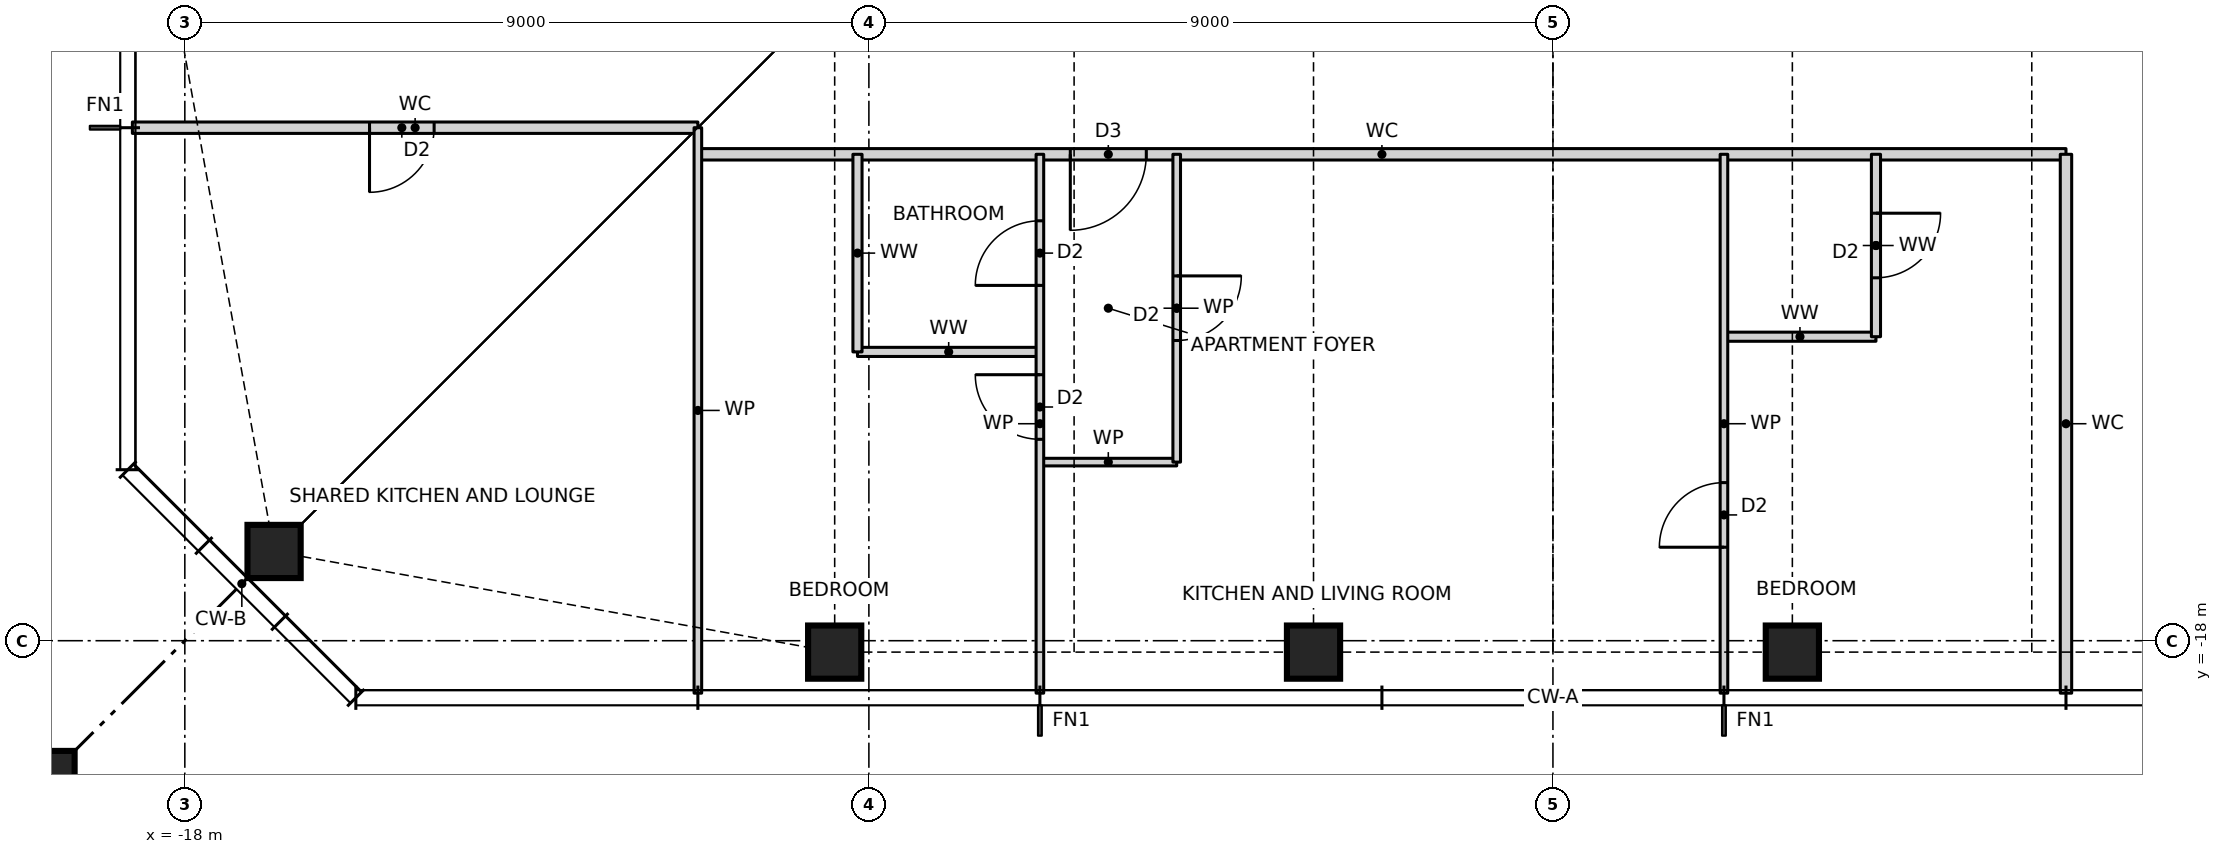
"""IFC4 building model, lengths in metres.
Left out: names, types, materials, properties, quantities, classifications, styles, units other than length and angle.
Written with IfcOpenShell. Run it as: python <this file> out.ifc"""

import sys

from ifc_helpers import new_model, si_unit, direction, frame, frame_2d, origin, origin_2d, place, context, subcontext, project, spatial, rectangle, hollow_rectangle, i_section, extrude, element, fill, save


model = new_model("IFC4")
c1 = context("Model", 3, precision=1e-05, world=origin(), true_north=direction((0.0, 1.0)))
c2 = subcontext(c1, "Body", "Model", "MODEL_VIEW")
j1 = project(units=[si_unit("LENGTHUNIT", "METRE"), si_unit("PLANEANGLEUNIT", "RADIAN")], contexts=[c1])
p1 = place(None, origin())
s1 = spatial("IfcSite", under=j1, at=p1, CompositionType="ELEMENT")
p2 = place(p1, origin())
s2 = spatial("IfcBuilding", under=s1, at=p2, CompositionType="ELEMENT")
p3 = place(p2, frame((0.0, 0.0, 177.5)))
s3 = spatial("IfcBuildingStorey", under=s2, at=p3, CompositionType="ELEMENT", Elevation=177.5)
for number, where, z_axis, x_axis in (
    (1, (-16.826, -16.826, 0.0), (0.0, 0.0, 1.0), (1.0, 0.0, 0.0)),
    (2, (-9.45, -18.15, 0.0), (0.0, 0.0, 1.0), (1.0, 0.0, 0.0)),
    (3, (-3.15, -18.15, 0.0), (0.0, 0.0, 1.0), (1.0, 0.0, 0.0)),
    (4, (3.15, -18.15, 0.0), (0.0, 0.0, 1.0), (1.0, 0.0, 0.0)),
):
    element("IfcColumn", number, at=place(p3, frame(where, z_axis=z_axis, x_axis=x_axis)), inside=s3, PredefinedType="COLUMN", context=c2, shape_type="SweptSolid", body=[
        extrude(hollow_rectangle(XDim=0.7, YDim=0.7, WallThickness=0.06, at=origin_2d()), origin(), (0.0, 0.0, 1.0), 3.5),
    ])
p4 = place(p3, frame((-21.65, -21.65, 0.0), z_axis=(0.0, 0.0, 1.0), x_axis=(1.0, 0.0, 0.0)))
e5 = element("IfcColumn", 5, at=p4, inside=s3, PredefinedType="COLUMN", context=c2, shape_type="SweptSolid", body=[
    extrude(rectangle(XDim=4.4, YDim=4.4, at=origin_2d()), origin(), (0.0, 0.0, 1.0), 3.5),
    extrude(i_section(OverallWidth=0.478, OverallDepth=0.599, WebThickness=0.1, FlangeThickness=0.14, at=origin_2d()), origin(), (0.0, 0.0, 1.0), 3.5),
])
p5 = place(p3, frame((-6.75, -15.65, 0.0), z_axis=(0.0, 0.0, 1.0), x_axis=(1.0, 0.0, 0.0)))
e6 = element("IfcWall", 6, at=p5, inside=s3, PredefinedType="PARTITIONING", context=c2, shape_type="SweptSolid", body=[
    extrude(rectangle(XDim=1.8, YDim=0.1, at=frame_2d((0.9, 0.0))), origin(), (0.0, 0.0, 1.0), 3.27),
])
p6 = place(p3, frame((-9.15, -14.2, 0.0), z_axis=(0.0, 0.0, 1.0), x_axis=(1.0, 0.0, 0.0)))
e7 = element("IfcWall", 7, at=p6, inside=s3, PredefinedType="PARTITIONING", context=c2, shape_type="SweptSolid", body=[
    extrude(rectangle(XDim=2.4, YDim=0.12, at=frame_2d((1.2, 0.0))), origin(), (0.0, 0.0, 1.0), 3.27),
])
p7 = place(p3, frame((2.25, -14.0, 0.0), z_axis=(0.0, 0.0, 1.0), x_axis=(1.0, 0.0, 0.0)))
e8 = element("IfcWall", 8, at=p7, inside=s3, PredefinedType="PARTITIONING", context=c2, shape_type="SweptSolid", body=[
    extrude(rectangle(XDim=2.0, YDim=0.12, at=frame_2d((1.0, 0.0))), origin(), (0.0, 0.0, 1.0), 3.27),
])
p8 = place(p3, frame((-11.25, -11.6, 0.0), z_axis=(0.0, 0.0, 1.0), x_axis=(1.0, 0.0, 0.0)))
e9 = element("IfcWall", 9, at=p8, inside=s3, PredefinedType="PARTITIONING", context=c2, shape_type="SweptSolid", body=[
    extrude(rectangle(XDim=18.0, YDim=0.15, at=frame_2d((9.0, 0.0))), origin(), (0.0, 0.0, 1.0), 3.27),
])
p9 = place(p8, frame((4.9, 0.0, 0.0)))
e10 = element("IfcOpeningElement", 10, at=p9, cuts=e9, PredefinedType="OPENING", context=c2, shape_type="SweptSolid", body=[
    extrude(rectangle(XDim=1.0, YDim=2.1, at=frame_2d((0.5, 1.05))), frame((0.0, 0.085, 0.0), z_axis=(0.0, -1.0, 0.0), x_axis=(1.0, 0.0, 0.0)), (0.0, 0.0, 1.0), 0.17),
])
p10 = place(p3, frame((-18.69, -11.25, 0.0), z_axis=(0.0, 0.0, 1.0), x_axis=(1.0, 0.0, 0.0)))
e11 = element("IfcWall", 11, at=p10, inside=s3, PredefinedType="PARTITIONING", context=c2, shape_type="SweptSolid", body=[
    extrude(rectangle(XDim=7.44, YDim=0.15, at=frame_2d((3.72, 0.0))), origin(), (0.0, 0.0, 1.0), 3.27),
])
p11 = place(p10, frame((3.12, 0.0, 0.0)))
e12 = element("IfcOpeningElement", 12, at=p11, cuts=e11, PredefinedType="OPENING", context=c2, shape_type="SweptSolid", body=[
    extrude(rectangle(XDim=0.85, YDim=2.1, at=frame_2d((0.425, 1.05))), frame((0.0, 0.085, 0.0), z_axis=(0.0, -1.0, 0.0), x_axis=(1.0, 0.0, 0.0)), (0.0, 0.0, 1.0), 0.17),
])
p12 = place(p3, frame((6.75, -18.69, 0.0), z_axis=(0.0, 0.0, 1.0), x_axis=(0.0, 1.0, 0.0)))
e13 = element("IfcWall", 13, at=p12, inside=s3, PredefinedType="PARTITIONING", context=c2, shape_type="SweptSolid", body=[
    extrude(rectangle(XDim=7.09, YDim=0.15, at=frame_2d((3.545, 0.0))), origin(), (0.0, 0.0, 1.0), 3.27),
])
p13 = place(p3, frame((4.25, -14.0, 0.0), z_axis=(0.0, 0.0, 1.0), x_axis=(0.0, 1.0, 0.0)))
e14 = element("IfcWall", 14, at=p13, inside=s3, PredefinedType="PARTITIONING", context=c2, shape_type="SweptSolid", body=[
    extrude(rectangle(XDim=2.4, YDim=0.12, at=frame_2d((1.2, 0.0))), origin(), (0.0, 0.0, 1.0), 3.27),
])
p14 = place(p13, frame((0.775, 0.0, 0.0)))
e15 = element("IfcOpeningElement", 15, at=p14, cuts=e14, PredefinedType="OPENING", context=c2, shape_type="SweptSolid", body=[
    extrude(rectangle(XDim=0.85, YDim=2.1, at=frame_2d((0.425, 1.05))), frame((0.0, 0.07, 0.0), z_axis=(0.0, -1.0, 0.0), x_axis=(1.0, 0.0, 0.0)), (0.0, 0.0, 1.0), 0.14),
])
p15 = place(p3, frame((2.25, -18.69, 0.0), z_axis=(0.0, 0.0, 1.0), x_axis=(0.0, 1.0, 0.0)))
e16 = element("IfcWall", 16, at=p15, inside=s3, PredefinedType="PARTITIONING", context=c2, shape_type="SweptSolid", body=[
    extrude(rectangle(XDim=7.09, YDim=0.1, at=frame_2d((3.545, 0.0))), origin(), (0.0, 0.0, 1.0), 3.27),
])
p16 = place(p15, frame((1.92, 0.0, 0.0)))
e17 = element("IfcOpeningElement", 17, at=p16, cuts=e16, PredefinedType="OPENING", context=c2, shape_type="SweptSolid", body=[
    extrude(rectangle(XDim=0.85, YDim=2.1, at=frame_2d((0.425, 1.05))), frame((0.0, 0.06, 0.0), z_axis=(0.0, -1.0, 0.0), x_axis=(1.0, 0.0, 0.0)), (0.0, 0.0, 1.0), 0.12),
])
p17 = place(p3, frame((-4.95, -15.65, 0.0), z_axis=(0.0, 0.0, 1.0), x_axis=(0.0, 1.0, 0.0)))
e18 = element("IfcWall", 18, at=p17, inside=s3, PredefinedType="PARTITIONING", context=c2, shape_type="SweptSolid", body=[
    extrude(rectangle(XDim=4.05, YDim=0.1, at=frame_2d((2.025, 0.0))), origin(), (0.0, 0.0, 1.0), 3.27),
])
p18 = place(p17, frame((1.6, 0.0, 0.0)))
e19 = element("IfcOpeningElement", 19, at=p18, cuts=e18, PredefinedType="OPENING", context=c2, shape_type="SweptSolid", body=[
    extrude(rectangle(XDim=0.85, YDim=2.1, at=frame_2d((0.425, 1.05))), frame((0.0, 0.06, 0.0), z_axis=(0.0, -1.0, 0.0), x_axis=(1.0, 0.0, 0.0)), (0.0, 0.0, 1.0), 0.12),
])
p19 = place(p3, frame((-6.75, -18.69, 0.0), z_axis=(0.0, 0.0, 1.0), x_axis=(0.0, 1.0, 0.0)))
e20 = element("IfcWall", 20, at=p19, inside=s3, PredefinedType="PARTITIONING", context=c2, shape_type="SweptSolid", body=[
    extrude(rectangle(XDim=7.09, YDim=0.1, at=frame_2d((3.545, 0.0))), origin(), (0.0, 0.0, 1.0), 3.27),
])
p20 = place(p19, frame((3.34, 0.0, 0.0)))
e21 = element("IfcOpeningElement", 21, at=p20, cuts=e20, PredefinedType="OPENING", context=c2, shape_type="SweptSolid", body=[
    extrude(rectangle(XDim=0.85, YDim=2.1, at=frame_2d((0.425, 1.05))), frame((0.0, 0.06, 0.0), z_axis=(0.0, -1.0, 0.0), x_axis=(1.0, 0.0, 0.0)), (0.0, 0.0, 1.0), 0.12),
])
p21 = place(p19, frame((5.365, 0.0, 0.0)))
e22 = element("IfcOpeningElement", 22, at=p21, cuts=e20, PredefinedType="OPENING", context=c2, shape_type="SweptSolid", body=[
    extrude(rectangle(XDim=0.85, YDim=2.1, at=frame_2d((0.425, 1.05))), frame((0.0, 0.06, 0.0), z_axis=(0.0, -1.0, 0.0), x_axis=(1.0, 0.0, 0.0)), (0.0, 0.0, 1.0), 0.12),
])
p22 = place(p3, frame((-9.15, -14.2, 0.0), z_axis=(0.0, 0.0, 1.0), x_axis=(0.0, 1.0, 0.0)))
e23 = element("IfcWall", 23, at=p22, inside=s3, PredefinedType="PARTITIONING", context=c2, shape_type="SweptSolid", body=[
    extrude(rectangle(XDim=2.6, YDim=0.12, at=frame_2d((1.3, 0.0))), origin(), (0.0, 0.0, 1.0), 3.27),
])
p23 = place(p3, frame((-11.25, -18.69, 0.0), z_axis=(0.0, 0.0, 1.0), x_axis=(0.0, 1.0, 0.0)))
e24 = element("IfcWall", 24, at=p23, inside=s3, PredefinedType="PARTITIONING", context=c2, shape_type="SweptSolid", body=[
    extrude(rectangle(XDim=7.44, YDim=0.1, at=frame_2d((3.72, 0.0))), origin(), (0.0, 0.0, 1.0), 3.27),
])
p24 = place(p9, frame((1.0, 0.0, 0.0), z_axis=(0.0, 0.0, 1.0), x_axis=(-1.0, 0.0, 0.0)))
e25 = element("IfcDoor", 25, at=p24, inside=s3, OperationType="SINGLE_SWING_RIGHT", PredefinedType="DOOR", context=c2, shape_type="SweptSolid", body=[
    extrude(rectangle(XDim=1.0, YDim=2.1, at=frame_2d((0.5, 1.05))), frame((0.0, 0.025, 0.0), z_axis=(0.0, -1.0, 0.0), x_axis=(1.0, 0.0, 0.0)), (0.0, 0.0, 1.0), 0.05),
])
fill(e10, e25)
p25 = place(p18, frame((0.85, 0.0, 0.0), z_axis=(0.0, 0.0, 1.0), x_axis=(-1.0, 0.0, 0.0)))
e26 = element("IfcDoor", 26, at=p25, inside=s3, OperationType="SINGLE_SWING_LEFT", PredefinedType="DOOR", context=c2, shape_type="SweptSolid", body=[
    extrude(rectangle(XDim=0.85, YDim=2.1, at=frame_2d((0.425, 1.05))), frame((0.0, 0.025, 0.0), z_axis=(0.0, -1.0, 0.0), x_axis=(1.0, 0.0, 0.0)), (0.0, 0.0, 1.0), 0.05),
])
fill(e19, e26)
p26 = place(p20, origin())
e27 = element("IfcDoor", 27, at=p26, inside=s3, OperationType="SINGLE_SWING_RIGHT", PredefinedType="DOOR", context=c2, shape_type="SweptSolid", body=[
    extrude(rectangle(XDim=0.85, YDim=2.1, at=frame_2d((0.425, 1.05))), frame((0.0, 0.025, 0.0), z_axis=(0.0, -1.0, 0.0), x_axis=(1.0, 0.0, 0.0)), (0.0, 0.0, 1.0), 0.05),
])
fill(e21, e27)
p27 = place(p21, origin())
e28 = element("IfcDoor", 28, at=p27, inside=s3, OperationType="SINGLE_SWING_LEFT", PredefinedType="DOOR", context=c2, shape_type="SweptSolid", body=[
    extrude(rectangle(XDim=0.85, YDim=2.1, at=frame_2d((0.425, 1.05))), frame((0.0, 0.025, 0.0), z_axis=(0.0, -1.0, 0.0), x_axis=(1.0, 0.0, 0.0)), (0.0, 0.0, 1.0), 0.05),
])
fill(e22, e28)
p28 = place(p16, origin())
e29 = element("IfcDoor", 29, at=p28, inside=s3, OperationType="SINGLE_SWING_LEFT", PredefinedType="DOOR", context=c2, shape_type="SweptSolid", body=[
    extrude(rectangle(XDim=0.85, YDim=2.1, at=frame_2d((0.425, 1.05))), frame((0.0, 0.025, 0.0), z_axis=(0.0, -1.0, 0.0), x_axis=(1.0, 0.0, 0.0)), (0.0, 0.0, 1.0), 0.05),
])
fill(e17, e29)
p29 = place(p14, frame((0.85, 0.0, 0.0), z_axis=(0.0, 0.0, 1.0), x_axis=(-1.0, 0.0, 0.0)))
e30 = element("IfcDoor", 30, at=p29, inside=s3, OperationType="SINGLE_SWING_LEFT", PredefinedType="DOOR", context=c2, shape_type="SweptSolid", body=[
    extrude(rectangle(XDim=0.85, YDim=2.1, at=frame_2d((0.425, 1.05))), frame((0.0, 0.025, 0.0), z_axis=(0.0, -1.0, 0.0), x_axis=(1.0, 0.0, 0.0)), (0.0, 0.0, 1.0), 0.05),
])
fill(e15, e30)
p30 = place(p11, frame((0.85, 0.0, 0.0), z_axis=(0.0, 0.0, 1.0), x_axis=(-1.0, 0.0, 0.0)))
e31 = element("IfcDoor", 31, at=p30, inside=s3, OperationType="SINGLE_SWING_RIGHT", PredefinedType="DOOR", context=c2, shape_type="SweptSolid", body=[
    extrude(rectangle(XDim=0.85, YDim=2.1, at=frame_2d((0.425, 1.05))), frame((0.0, 0.025, 0.0), z_axis=(0.0, -1.0, 0.0), x_axis=(1.0, 0.0, 0.0)), (0.0, 0.0, 1.0), 0.05),
])
fill(e12, e31)
save(model, sys.argv[1])
